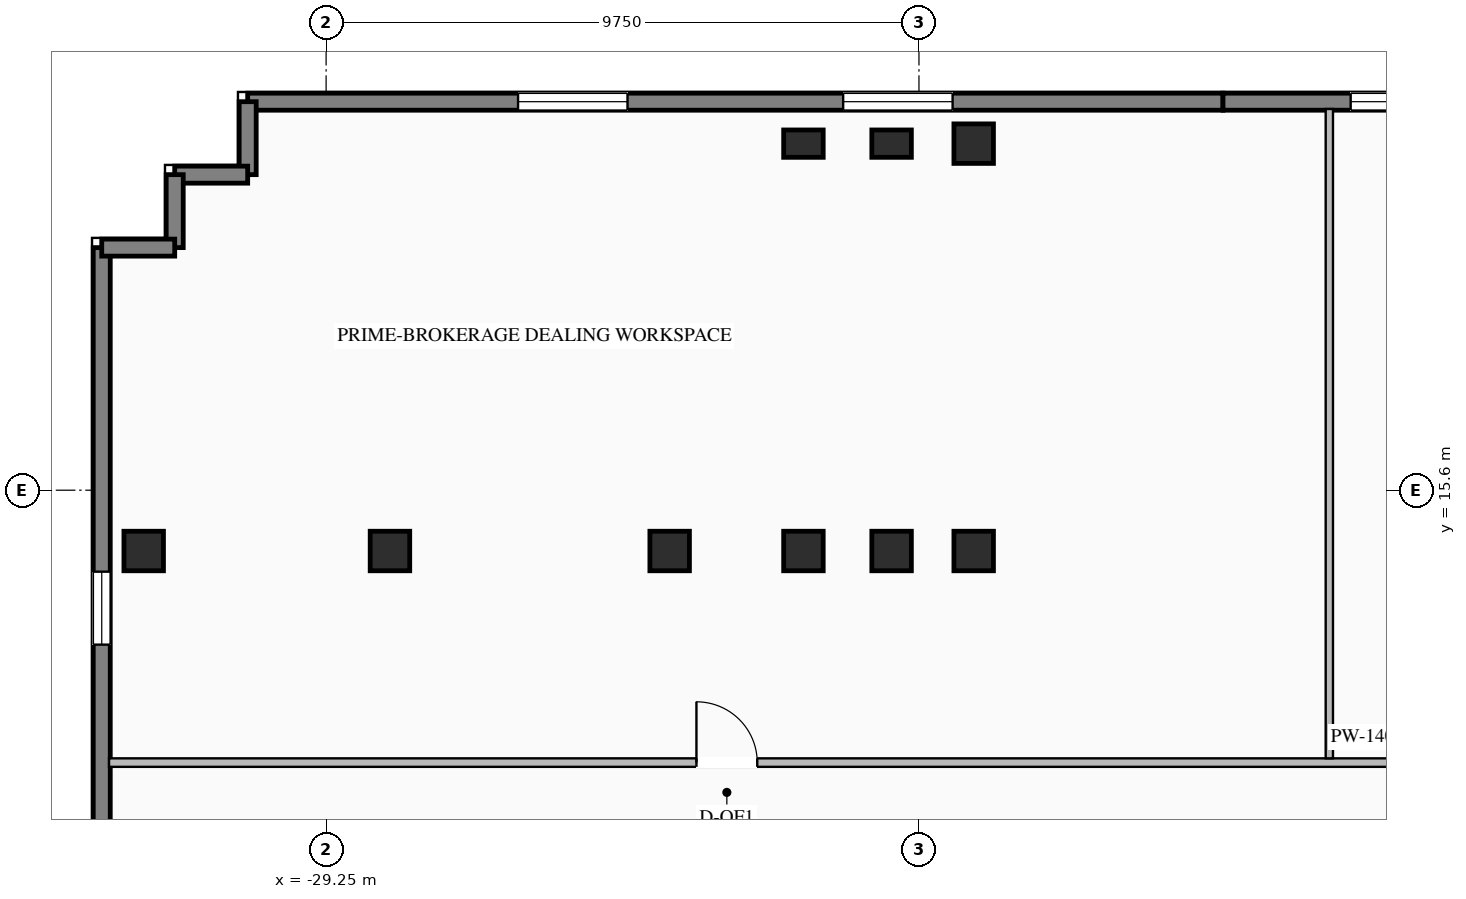
"""IFC4 building model, lengths in metres.
Left out: names, types, materials, properties, quantities, classifications, styles, units other than length and angle.
Written with IfcOpenShell. Run it as: python <this file> out.ifc"""

import sys

from ifc_helpers import new_model, si_unit, direction, frame, frame_2d, origin, origin_2d, place, context, subcontext, project, spatial, rectangle, i_section, extrude, element, fill, save


model = new_model("IFC4")
c1 = context("Model", 3, precision=1e-05, world=origin(), true_north=direction((0.0, 1.0)))
c2 = subcontext(c1, "Body", "Model", "MODEL_VIEW")
j1 = project(units=[si_unit("LENGTHUNIT", "METRE"), si_unit("PLANEANGLEUNIT", "RADIAN")], contexts=[c1])
p1 = place(None, origin())
s1 = spatial("IfcSite", under=j1, at=p1, CompositionType="ELEMENT")
p2 = place(p1, origin())
s2 = spatial("IfcBuilding", under=s1, at=p2, CompositionType="ELEMENT")
p3 = place(p2, frame((0.0, 0.0, 120.85)))
s3 = spatial("IfcBuildingStorey", under=s2, at=p3, CompositionType="ELEMENT", Elevation=120.85)
for number, where, z_axis, x_axis in (
    (1, (-21.4, 14.6, 0.0), (0.0, 0.0, 1.0), (1.0, 0.0, 0.0)),
    (2, (-19.95, 14.6, 0.0), (0.0, 0.0, 1.0), (1.0, 0.0, 0.0)),
    (3, (-18.6, 14.6, 0.0), (0.0, 0.0, 1.0), (1.0, 0.0, 0.0)),
    (4, (-23.6, 14.6, 0.0), (0.0, 0.0, 1.0), (1.0, 0.0, 0.0)),
    (5, (-28.2, 14.6, 0.0), (0.0, 0.0, 1.0), (1.0, 0.0, 0.0)),
    (6, (-18.6, 21.3, 0.0), (0.0, 0.0, 1.0), (1.0, 0.0, 0.0)),
    (7, (-32.25, 14.6, 0.0), (0.0, 0.0, 1.0), (1.0, 0.0, 0.0)),
):
    element("IfcColumn", number, at=place(p3, frame(where, z_axis=z_axis, x_axis=x_axis)), inside=s3, PredefinedType="COLUMN", context=c2, shape_type="SweptSolid", body=[
        extrude(i_section(OverallWidth=0.65, OverallDepth=0.65, WebThickness=0.028, FlangeThickness=0.04, at=origin_2d()), origin(), (0.0, 0.0, 1.0), 3.45),
    ])
for number, where, z_axis, x_axis in (
    (8, (-21.4, 21.3, 0.0), (0.0, 0.0, 1.0), (1.0, 0.0, 0.0)),
    (9, (-19.95, 21.3, 0.0), (0.0, 0.0, 1.0), (1.0, 0.0, 0.0)),
):
    element("IfcColumn", number, at=place(p3, frame(where, z_axis=z_axis, x_axis=x_axis)), inside=s3, PredefinedType="PILASTER", context=c2, shape_type="SweptSolid", body=[
        extrude(rectangle(XDim=0.65, YDim=0.45, at=origin_2d()), origin(), (0.0, 0.0, 1.0), 3.45),
    ])
p4 = place(p3, frame((-30.54, 21.99, 0.0), z_axis=(0.0, 0.0, 1.0), x_axis=(1.0, 0.0, 0.0)))
e10 = element("IfcWall", 10, at=p4, inside=s3, PredefinedType="STANDARD", context=c2, shape_type="SweptSolid", body=[
    extrude(rectangle(XDim=16.04, YDim=0.28, at=frame_2d((8.02, 0.0))), origin(), (0.0, 0.0, 1.0), 3.25),
])
p5 = place(p4, frame((4.447, 0.0, 0.76)))
e11 = element("IfcOpeningElement", 11, at=p5, cuts=e10, PredefinedType="OPENING", context=c2, shape_type="SweptSolid", body=[
    extrude(rectangle(XDim=1.8, YDim=1.95, at=frame_2d((0.9, 0.975))), frame((0.0, 0.15, 0.0), z_axis=(0.0, -1.0, 0.0), x_axis=(1.0, 0.0, 0.0)), (0.0, 0.0, 1.0), 0.3),
])
p6 = place(p4, frame((9.793, 0.0, 0.76)))
e12 = element("IfcOpeningElement", 12, at=p6, cuts=e10, PredefinedType="OPENING", context=c2, shape_type="SweptSolid", body=[
    extrude(rectangle(XDim=1.8, YDim=1.95, at=frame_2d((0.9, 0.975))), frame((0.0, 0.15, 0.0), z_axis=(0.0, -1.0, 0.0), x_axis=(1.0, 0.0, 0.0)), (0.0, 0.0, 1.0), 0.3),
])
p7 = place(p3, frame((-14.5, 21.99, 0.0), z_axis=(0.0, 0.0, 1.0), x_axis=(1.0, 0.0, 0.0)))
e13 = element("IfcWall", 13, at=p7, inside=s3, PredefinedType="STANDARD", context=c2, shape_type="SweptSolid", body=[
    extrude(rectangle(XDim=9.0, YDim=0.28, at=frame_2d((4.5, 0.0))), origin(), (0.0, 0.0, 1.0), 3.25),
])
p8 = place(p7, frame((2.1, 0.0, 0.76)))
e14 = element("IfcOpeningElement", 14, at=p8, cuts=e13, PredefinedType="OPENING", context=c2, shape_type="SweptSolid", body=[
    extrude(rectangle(XDim=1.8, YDim=1.95, at=frame_2d((0.9, 0.975))), frame((0.0, 0.15, 0.0), z_axis=(0.0, -1.0, 0.0), x_axis=(1.0, 0.0, 0.0)), (0.0, 0.0, 1.0), 0.3),
])
p9 = place(p7, frame((5.1, 0.0, 0.76)))
e15 = element("IfcOpeningElement", 15, at=p9, cuts=e13, PredefinedType="OPENING", context=c2, shape_type="SweptSolid", body=[
    extrude(rectangle(XDim=1.8, YDim=1.95, at=frame_2d((0.9, 0.975))), frame((0.0, 0.15, 0.0), z_axis=(0.0, -1.0, 0.0), x_axis=(1.0, 0.0, 0.0)), (0.0, 0.0, 1.0), 0.3),
])
p10 = place(p3, frame((-32.94, 1.8, 0.0), z_axis=(0.0, 0.0, 1.0), x_axis=(0.0, 1.0, 0.0)))
e16 = element("IfcWall", 16, at=p10, inside=s3, PredefinedType="STANDARD", context=c2, shape_type="SweptSolid", body=[
    extrude(rectangle(XDim=17.79, YDim=0.28, at=frame_2d((8.895, 0.0))), origin(), (0.0, 0.0, 1.0), 3.25),
])
p11 = place(p10, frame((5.33, 0.0, 0.76)))
e17 = element("IfcOpeningElement", 17, at=p11, cuts=e16, PredefinedType="OPENING", context=c2, shape_type="SweptSolid", body=[
    extrude(rectangle(XDim=1.2, YDim=1.95, at=frame_2d((0.6, 0.975))), frame((0.0, 0.15, 0.0), z_axis=(0.0, -1.0, 0.0), x_axis=(1.0, 0.0, 0.0)), (0.0, 0.0, 1.0), 0.3),
])
p12 = place(p10, frame((11.26, 0.0, 0.76)))
e18 = element("IfcOpeningElement", 18, at=p12, cuts=e16, PredefinedType="OPENING", context=c2, shape_type="SweptSolid", body=[
    extrude(rectangle(XDim=1.2, YDim=1.95, at=frame_2d((0.6, 0.975))), frame((0.0, 0.15, 0.0), z_axis=(0.0, -1.0, 0.0), x_axis=(1.0, 0.0, 0.0)), (0.0, 0.0, 1.0), 0.3),
])
for number, where, z_axis, x_axis in (
    (19, (-30.54, 21.99, 0.0), (0.0, 0.0, 1.0), (0.0, -1.0, 0.0)),
    (20, (-30.54, 20.79, 0.0), (0.0, 0.0, 1.0), (-1.0, 0.0, 0.0)),
    (21, (-31.74, 20.79, 0.0), (0.0, 0.0, 1.0), (0.0, -1.0, 0.0)),
    (22, (-31.74, 19.59, 0.0), (0.0, 0.0, 1.0), (-1.0, 0.0, 0.0)),
):
    element("IfcWall", number, at=place(p3, frame(where, z_axis=z_axis, x_axis=x_axis)), inside=s3, PredefinedType="STANDARD", context=c2, shape_type="SweptSolid", body=[
        extrude(rectangle(XDim=1.2, YDim=0.28, at=frame_2d((0.6, 0.0))), origin(), (0.0, 0.0, 1.0), 3.25),
    ])
p13 = place(p3, frame((-32.82, 11.12, 0.0), z_axis=(0.0, 0.0, 1.0), x_axis=(1.0, 0.0, 0.0)))
e23 = element("IfcWall", 23, at=p13, inside=s3, PredefinedType="STANDARD", context=c2, shape_type="SweptSolid", body=[
    extrude(rectangle(XDim=63.64, YDim=0.14, at=frame_2d((31.82, 0.0))), origin(), (0.0, 0.0, 1.0), 3.25),
])
p14 = place(p13, frame((9.66, 0.0, 0.0)))
e24 = element("IfcOpeningElement", 24, at=p14, cuts=e23, PredefinedType="OPENING", context=c2, shape_type="SweptSolid", body=[
    extrude(rectangle(XDim=1.0, YDim=2.08, at=frame_2d((0.5, 1.04))), frame((0.0, 0.08, 0.0), z_axis=(0.0, -1.0, 0.0), x_axis=(1.0, 0.0, 0.0)), (0.0, 0.0, 1.0), 0.16),
])
p15 = place(p13, frame((31.637, 0.0, 0.0)))
e25 = element("IfcOpeningElement", 25, at=p15, cuts=e23, PredefinedType="OPENING", context=c2, shape_type="SweptSolid", body=[
    extrude(rectangle(XDim=1.0, YDim=2.08, at=frame_2d((0.5, 1.04))), frame((0.0, 0.08, 0.0), z_axis=(0.0, -1.0, 0.0), x_axis=(1.0, 0.0, 0.0)), (0.0, 0.0, 1.0), 0.16),
])
p16 = place(p13, frame((53.297, 0.0, 0.0)))
e26 = element("IfcOpeningElement", 26, at=p16, cuts=e23, PredefinedType="OPENING", context=c2, shape_type="SweptSolid", body=[
    extrude(rectangle(XDim=1.0, YDim=2.08, at=frame_2d((0.5, 1.04))), frame((0.0, 0.08, 0.0), z_axis=(0.0, -1.0, 0.0), x_axis=(1.0, 0.0, 0.0)), (0.0, 0.0, 1.0), 0.16),
])
p17 = place(p3, frame((-12.751, 11.19, 0.0), z_axis=(0.0, 0.0, 1.0), x_axis=(0.0, 1.0, 0.0)))
e27 = element("IfcWall", 27, at=p17, inside=s3, PredefinedType="STANDARD", context=c2, shape_type="SweptSolid", body=[
    extrude(rectangle(XDim=10.68, YDim=0.12, at=frame_2d((5.34, 0.0))), origin(), (0.0, 0.0, 1.0), 3.25),
])
p18 = place(p5, origin())
e28 = element("IfcWindow", 28, at=p18, inside=s3, PartitioningType="SINGLE_PANEL", PredefinedType="WINDOW", context=c2, shape_type="SweptSolid", body=[
    extrude(rectangle(XDim=1.8, YDim=1.95, at=frame_2d((0.9, 0.975))), frame((0.0, 0.03, 0.0), z_axis=(0.0, -1.0, 0.0), x_axis=(1.0, 0.0, 0.0)), (0.0, 0.0, 1.0), 0.06),
])
fill(e11, e28)
p19 = place(p6, origin())
e29 = element("IfcWindow", 29, at=p19, inside=s3, PartitioningType="SINGLE_PANEL", PredefinedType="WINDOW", context=c2, shape_type="SweptSolid", body=[
    extrude(rectangle(XDim=1.8, YDim=1.95, at=frame_2d((0.9, 0.975))), frame((0.0, 0.03, 0.0), z_axis=(0.0, -1.0, 0.0), x_axis=(1.0, 0.0, 0.0)), (0.0, 0.0, 1.0), 0.06),
])
fill(e12, e29)
p20 = place(p8, origin())
e30 = element("IfcWindow", 30, at=p20, inside=s3, PartitioningType="SINGLE_PANEL", PredefinedType="WINDOW", context=c2, shape_type="SweptSolid", body=[
    extrude(rectangle(XDim=1.8, YDim=1.95, at=frame_2d((0.9, 0.975))), frame((0.0, 0.03, 0.0), z_axis=(0.0, -1.0, 0.0), x_axis=(1.0, 0.0, 0.0)), (0.0, 0.0, 1.0), 0.06),
])
fill(e14, e30)
p21 = place(p12, origin())
e31 = element("IfcWindow", 31, at=p21, inside=s3, PartitioningType="SINGLE_PANEL", PredefinedType="WINDOW", context=c2, shape_type="SweptSolid", body=[
    extrude(rectangle(XDim=1.2, YDim=1.95, at=frame_2d((0.6, 0.975))), frame((0.0, 0.03, 0.0), z_axis=(0.0, -1.0, 0.0), x_axis=(1.0, 0.0, 0.0)), (0.0, 0.0, 1.0), 0.06),
])
fill(e18, e31)
p22 = place(p14, origin())
e32 = element("IfcDoor", 32, at=p22, inside=s3, OperationType="SINGLE_SWING_LEFT", PredefinedType="DOOR", context=c2, shape_type="SweptSolid", body=[
    extrude(rectangle(XDim=1.0, YDim=2.08, at=frame_2d((0.5, 1.04))), frame((0.0, 0.025, 0.0), z_axis=(0.0, -1.0, 0.0), x_axis=(1.0, 0.0, 0.0)), (0.0, 0.0, 1.0), 0.05),
])
fill(e24, e32)
save(model, sys.argv[1])
